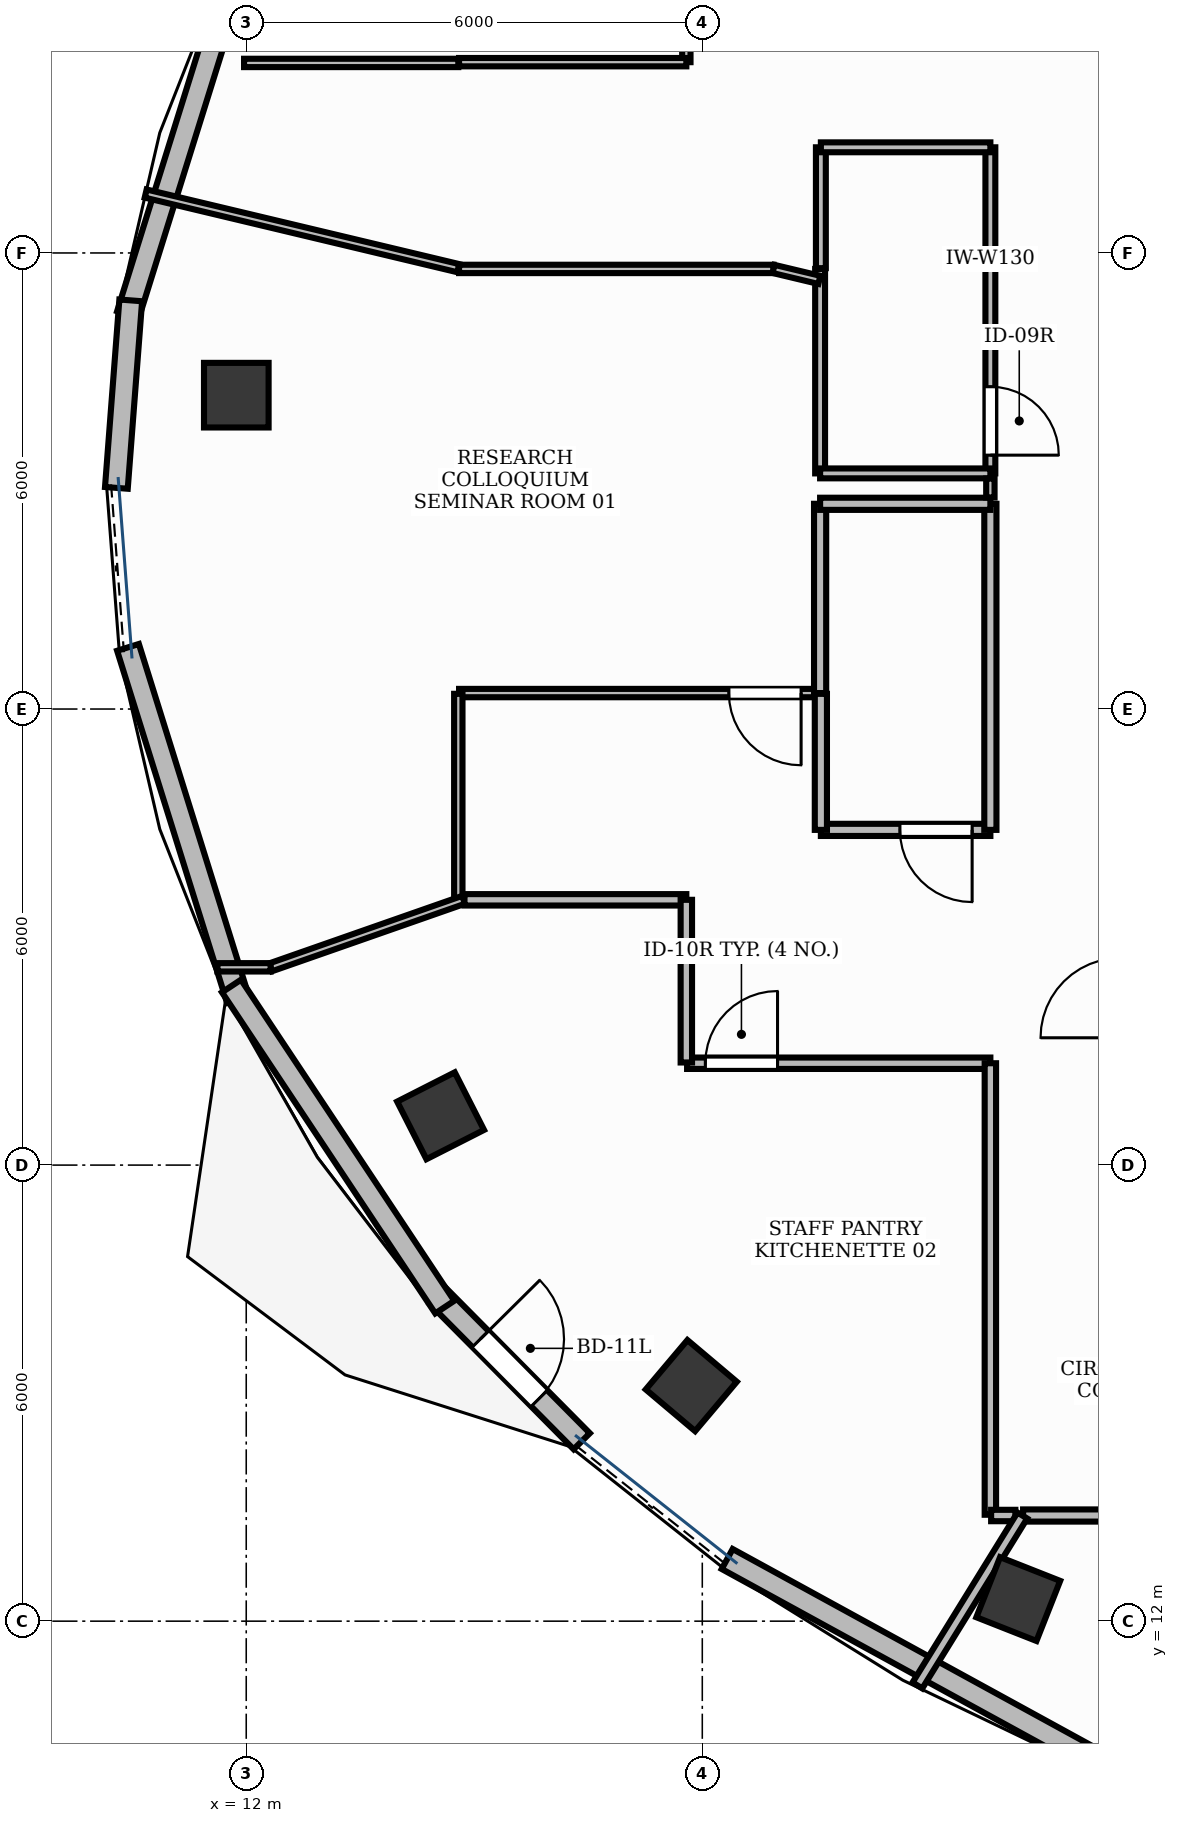
"""IFC4 building model, lengths in metres.
Left out: names, types, materials, properties, quantities, classifications, styles, units other than length and angle.
Written with IfcOpenShell. Run it as: python <this file> out.ifc"""

import sys

from ifc_helpers import new_model, si_unit, direction, frame, frame_2d, origin, origin_2d, place, context, subcontext, project, spatial, rectangle, extrude, element, fill, save


model = new_model("IFC4")
c1 = context("Model", 3, precision=1e-05, world=origin(), true_north=direction((0.0, 1.0)))
c2 = subcontext(c1, "Body", "Model", "MODEL_VIEW")
j1 = project(units=[si_unit("LENGTHUNIT", "METRE"), si_unit("PLANEANGLEUNIT", "RADIAN")], contexts=[c1])
p1 = place(None, origin())
s1 = spatial("IfcSite", under=j1, at=p1, CompositionType="ELEMENT")
p2 = place(p1, origin())
s2 = spatial("IfcBuilding", under=s1, at=p2, CompositionType="ELEMENT")
p3 = place(p2, frame((0.0, 0.0, 286.8)))
s3 = spatial("IfcBuildingStorey", under=s2, at=p3, CompositionType="ELEMENT", Elevation=286.8)
for number, where, z_axis, x_axis in (
    (1, (11.869, 28.129, -0.0), (0.0, 0.0, 1.0), (0.0, 1.0, 0.0)),
    (2, (14.557, 18.649, -0.0), (0.0, 0.0, 1.0), (-0.453, 0.891, 0.0)),
    (3, (17.855, 15.099, -0.0), (0.0, 0.0, 1.0), (-0.764, 0.645, 0.0)),
    (4, (22.157, 12.291, -0.0), (0.0, 0.0, 1.0), (-0.93, 0.367, 0.0)),
):
    element("IfcColumn", number, at=place(p3, frame(where, z_axis=z_axis, x_axis=x_axis)), inside=s3, PredefinedType="COLUMN", context=c2, shape_type="SweptSolid", body=[
        extrude(rectangle(XDim=0.85, YDim=0.85, at=origin_2d()), origin(), (0.0, 0.0, 1.0), 3.901),
    ])
p4 = place(p3, frame((14.522, 16.276, 0.0), z_axis=(0.0, 0.0, 1.0), x_axis=(0.703783131399, -0.710414881572, 0.0)))
e5 = element("IfcWall", 5, at=p4, inside=s3, PredefinedType="STANDARD", context=c2, shape_type="SweptSolid", body=[
    extrude(rectangle(XDim=2.688, YDim=0.3, at=frame_2d((1.344, 0.0))), origin(), (0.0, 0.0, 1.0), 3.9),
])
p5 = place(p4, frame((0.794, 0.0, 0.0)))
e6 = element("IfcOpeningElement", 6, at=p5, cuts=e5, PredefinedType="OPENING", context=c2, shape_type="SweptSolid", body=[
    extrude(rectangle(XDim=1.1, YDim=2.15, at=frame_2d((0.55, 1.075))), frame((0.0, 0.165, 0.0), z_axis=(0.0, -1.0, 0.0), x_axis=(1.0, 0.0, 0.0)), (0.0, 0.0, 1.0), 0.33),
])
p6 = place(p3, frame((11.891, 33.823, 0.0), z_axis=(0.0, 0.0, 1.0), x_axis=(-0.297974306034, -0.954573890772, 0.0)))
e7 = element("IfcWall", 7, at=p6, inside=s3, PredefinedType="STANDARD", context=c2, shape_type="SweptSolid", body=[
    extrude(rectangle(XDim=4.854, YDim=0.3, at=frame_2d((2.427, 0.0))), origin(), (0.0, 0.0, 1.0), 3.9),
])
p7 = place(p3, frame((10.48, 29.376, 0.0), z_axis=(0.0, 0.0, 1.0), x_axis=(-0.076379552952, -0.997078815285, 0.0)))
e8 = element("IfcWall", 8, at=p7, inside=s3, PredefinedType="STANDARD", context=c2, shape_type="SweptSolid", body=[
    extrude(rectangle(XDim=2.474, YDim=0.3, at=frame_2d((1.237, 0.0))), origin(), (0.0, 0.0, 1.0), 3.9),
])
p8 = place(p3, frame((10.445, 24.811, 0.0), z_axis=(0.0, 0.0, 1.0), x_axis=(0.297974306034, -0.954573890772, 0.0)))
e9 = element("IfcWall", 9, at=p8, inside=s3, PredefinedType="STANDARD", context=c2, shape_type="SweptSolid", body=[
    extrude(rectangle(XDim=4.854, YDim=0.3, at=frame_2d((2.427, 0.0))), origin(), (0.0, 0.0, 1.0), 3.9),
])
p9 = place(p3, frame((11.806, 20.356, 0.0), z_axis=(0.0, 0.0, 1.0), x_axis=(0.553332864868, -0.832960227536, 0.0)))
e10 = element("IfcWall", 10, at=p9, inside=s3, PredefinedType="STANDARD", context=c2, shape_type="SweptSolid", body=[
    extrude(rectangle(XDim=5.071, YDim=0.3, at=frame_2d((2.535, 0.0))), origin(), (0.0, 0.0, 1.0), 3.9),
])
p10 = place(p3, frame((18.327, 12.818, 0.0), z_axis=(0.0, 0.0, 1.0), x_axis=(0.877062479499, -0.480376318166, 0.0)))
e11 = element("IfcWall", 11, at=p10, inside=s3, PredefinedType="STANDARD", context=c2, shape_type="SweptSolid", body=[
    extrude(rectangle(XDim=5.654, YDim=0.3, at=frame_2d((2.827, 0.0))), origin(), (0.0, 0.0, 1.0), 3.9),
])
p11 = place(p3, frame((21.79, 22.41, 0.0), z_axis=(0.0, 0.0, 1.0), x_axis=(-1.0, 0.0, 0.0)))
e12 = element("IfcWall", 12, at=p11, inside=s3, PredefinedType="PARTITIONING", context=c2, shape_type="SweptSolid", body=[
    extrude(rectangle(XDim=2.23, YDim=0.16, at=frame_2d((1.115, 0.0))), origin(), (0.0, 0.0, 1.0), 2.22),
])
p12 = place(p11, frame((0.24, 0.0, 0.0)))
e13 = element("IfcOpeningElement", 13, at=p12, cuts=e12, PredefinedType="OPENING", context=c2, shape_type="SweptSolid", body=[
    extrude(rectangle(XDim=0.95, YDim=2.15, at=frame_2d((0.475, 1.075))), frame((0.0, 0.095, 0.0), z_axis=(0.0, -1.0, 0.0), x_axis=(1.0, 0.0, 0.0)), (0.0, 0.0, 1.0), 0.19),
])
p13 = place(p3, frame((21.79, 31.39, 0.0), z_axis=(0.0, 0.0, 1.0), x_axis=(0.0, -1.0, 0.0)))
e14 = element("IfcWall", 14, at=p13, inside=s3, PredefinedType="PARTITIONING", context=c2, shape_type="SweptSolid", body=[
    extrude(rectangle(XDim=4.29, YDim=0.13, at=frame_2d((2.145, 0.0))), origin(), (0.0, 0.0, 1.0), 2.22),
])
p14 = place(p13, frame((3.15, 0.0, 0.0)))
e15 = element("IfcOpeningElement", 15, at=p14, cuts=e14, PredefinedType="OPENING", context=c2, shape_type="SweptSolid", body=[
    extrude(rectangle(XDim=0.9, YDim=2.15, at=frame_2d((0.45, 1.075))), frame((0.0, 0.08, 0.0), z_axis=(0.0, -1.0, 0.0), x_axis=(1.0, 0.0, 0.0)), (0.0, 0.0, 1.0), 0.16),
])
p15 = place(p3, frame((19.54, 24.21, 0.0), z_axis=(0.0, 0.0, 1.0), x_axis=(-1.0, 0.0, 0.0)))
e16 = element("IfcWall", 16, at=p15, inside=s3, PredefinedType="MOVABLE", context=c2, shape_type="SweptSolid", body=[
    extrude(rectangle(XDim=4.74, YDim=0.11, at=frame_2d((2.37, 0.0))), origin(), (0.0, 0.0, 1.0), 2.22),
])
p16 = place(p15, frame((0.24, 0.0, 0.0)))
e17 = element("IfcOpeningElement", 17, at=p16, cuts=e16, PredefinedType="OPENING", context=c2, shape_type="SweptSolid", body=[
    extrude(rectangle(XDim=0.95, YDim=2.15, at=frame_2d((0.475, 1.075))), frame((0.0, 0.07, 0.0), z_axis=(0.0, -1.0, 0.0), x_axis=(1.0, 0.0, 0.0)), (0.0, 0.0, 1.0), 0.14),
])
p17 = place(p3, frame((17.8, 19.34, 0.0), z_axis=(0.0, 0.0, 1.0), x_axis=(1.0, 0.0, 0.0)))
e18 = element("IfcWall", 18, at=p17, inside=s3, PredefinedType="PARTITIONING", context=c2, shape_type="SweptSolid", body=[
    extrude(rectangle(XDim=3.99, YDim=0.15, at=frame_2d((1.995, 0.0))), origin(), (0.0, 0.0, 1.0), 2.22),
])
p18 = place(p17, frame((0.24, 0.0, 0.0)))
e19 = element("IfcOpeningElement", 19, at=p18, cuts=e18, PredefinedType="OPENING", context=c2, shape_type="SweptSolid", body=[
    extrude(rectangle(XDim=0.95, YDim=2.15, at=frame_2d((0.475, 1.075))), frame((0.0, 0.09, 0.0), z_axis=(0.0, -1.0, 0.0), x_axis=(1.0, 0.0, 0.0)), (0.0, 0.0, 1.0), 0.18),
])
p19 = place(p3, frame((22.22, 13.39, 0.0), z_axis=(0.0, 0.0, 1.0), x_axis=(1.0, 0.0, 0.0)))
e20 = element("IfcWall", 20, at=p19, inside=s3, PredefinedType="PARTITIONING", context=c2, shape_type="SweptSolid", body=[
    extrude(rectangle(XDim=11.478, YDim=0.16, at=frame_2d((5.739, 0.0))), origin(), (0.0, 0.0, 1.0), 2.22),
])
p20 = place(p19, frame((7.786, 0.0, 0.0)))
e21 = element("IfcOpeningElement", 21, at=p20, cuts=e20, PredefinedType="OPENING", context=c2, shape_type="SweptSolid", body=[
    extrude(rectangle(XDim=0.95, YDim=2.15, at=frame_2d((0.475, 1.075))), frame((0.0, 0.095, 0.0), z_axis=(0.0, -1.0, 0.0), x_axis=(1.0, 0.0, 0.0)), (0.0, 0.0, 1.0), 0.19),
])
p21 = place(p3, frame((21.79, 26.7, 0.0), z_axis=(0.0, 0.0, 1.0), x_axis=(0.0, -1.0, 0.0)))
e22 = element("IfcWall", 22, at=p21, inside=s3, PredefinedType="PARTITIONING", context=c2, shape_type="SweptSolid", body=[
    extrude(rectangle(XDim=4.29, YDim=0.16, at=frame_2d((2.145, 0.0))), origin(), (0.0, 0.0, 1.0), 2.22),
])
p22 = place(p3, frame((19.56, 22.41, 0.0), z_axis=(0.0, 0.0, 1.0), x_axis=(0.0, 1.0, 0.0)))
e23 = element("IfcWall", 23, at=p22, inside=s3, PredefinedType="PARTITIONING", context=c2, shape_type="SweptSolid", body=[
    extrude(rectangle(XDim=1.79, YDim=0.16, at=frame_2d((0.895, 0.0))), origin(), (0.0, 0.0, 1.0), 2.22),
])
p23 = place(p3, frame((19.55, 24.21, 0.0), z_axis=(0.0, 0.0, 1.0), x_axis=(0.0, 1.0, 0.0)))
e24 = element("IfcWall", 24, at=p23, inside=s3, PredefinedType="PARTITIONING", context=c2, shape_type="SweptSolid", body=[
    extrude(rectangle(XDim=2.49, YDim=0.16, at=frame_2d((1.245, 0.0))), origin(), (0.0, 0.0, 1.0), 2.22),
])
p24 = place(p3, frame((19.55, 26.7, 0.0), z_axis=(0.0, 0.0, 1.0), x_axis=(1.0, 0.0, 0.0)))
e25 = element("IfcWall", 25, at=p24, inside=s3, PredefinedType="PARTITIONING", context=c2, shape_type="SweptSolid", body=[
    extrude(rectangle(XDim=2.24, YDim=0.16, at=frame_2d((1.12, 0.0))), origin(), (0.0, 0.0, 1.0), 2.22),
])
p25 = place(p3, frame((19.55, 27.1, 0.0), z_axis=(0.0, 0.0, 1.0), x_axis=(0.0, 1.0, 0.0)))
e26 = element("IfcWall", 26, at=p25, inside=s3, PredefinedType="PARTITIONING", context=c2, shape_type="SweptSolid", body=[
    extrude(rectangle(XDim=2.69, YDim=0.13, at=frame_2d((1.345, 0.0))), origin(), (0.0, 0.0, 1.0), 2.22),
])
p26 = place(p3, frame((19.56, 29.8, 0.0), z_axis=(0.0, 0.0, 1.0), x_axis=(0.0, 1.0, 0.0)))
e27 = element("IfcWall", 27, at=p26, inside=s3, PredefinedType="PARTITIONING", context=c2, shape_type="SweptSolid", body=[
    extrude(rectangle(XDim=1.59, YDim=0.13, at=frame_2d((0.795, 0.0))), origin(), (0.0, 0.0, 1.0), 2.22),
])
p27 = place(p3, frame((19.56, 31.39, 0.0), z_axis=(0.0, 0.0, 1.0), x_axis=(1.0, 0.0, 0.0)))
e28 = element("IfcWall", 28, at=p27, inside=s3, PredefinedType="PARTITIONING", context=c2, shape_type="SweptSolid", body=[
    extrude(rectangle(XDim=2.23, YDim=0.13, at=frame_2d((1.115, 0.0))), origin(), (0.0, 0.0, 1.0), 2.22),
])
p28 = place(p3, frame((21.79, 27.1, 0.0), z_axis=(0.0, 0.0, 1.0), x_axis=(-1.0, 0.0, 0.0)))
e29 = element("IfcWall", 29, at=p28, inside=s3, PredefinedType="PARTITIONING", context=c2, shape_type="SweptSolid", body=[
    extrude(rectangle(XDim=2.24, YDim=0.13, at=frame_2d((1.12, 0.0))), origin(), (0.0, 0.0, 1.0), 2.22),
])
p29 = place(p3, frame((10.677, 30.781, 0.0), z_axis=(0.0, 0.0, 1.0), x_axis=(0.972691489336, -0.232101845262, 0.0)))
e30 = element("IfcWall", 30, at=p29, inside=s3, PredefinedType="MOVABLE", context=c2, shape_type="SweptSolid", body=[
    extrude(rectangle(XDim=4.229, YDim=0.11, at=frame_2d((2.114, 0.0))), origin(), (0.0, 0.0, 1.0), 2.22),
])
p30 = place(p3, frame((14.8, 29.79, 0.0), z_axis=(0.0, 0.0, 1.0), x_axis=(1.0, 0.0, 0.0)))
e31 = element("IfcWall", 31, at=p30, inside=s3, PredefinedType="MOVABLE", context=c2, shape_type="SweptSolid", body=[
    extrude(rectangle(XDim=4.137, YDim=0.11, at=frame_2d((2.068, 0.0))), origin(), (0.0, 0.0, 1.0), 2.22),
])
p31 = place(p3, frame((18.937, 29.79, 0.0), z_axis=(0.0, 0.0, 1.0), x_axis=(0.972569213729, -0.232613680823, 0.0)))
e32 = element("IfcWall", 32, at=p31, inside=s3, PredefinedType="MOVABLE", context=c2, shape_type="SweptSolid", body=[
    extrude(rectangle(XDim=0.62, YDim=0.11, at=frame_2d((0.31, 0.0))), origin(), (0.0, 0.0, 1.0), 2.22),
])
p32 = place(p3, frame((21.79, 27.032, 0.0), z_axis=(0.0, 0.0, 1.0), x_axis=(0.0, -1.0, 0.0)))
e33 = element("IfcWall", 33, at=p32, inside=s3, PredefinedType="MOVABLE", context=c2, shape_type="SweptSolid", body=[
    extrude(rectangle(XDim=0.249, YDim=0.11, at=frame_2d((0.125, 0.0))), origin(), (0.0, 0.0, 1.0), 2.22),
])
p33 = place(p3, frame((14.79, 24.2, 0.0), z_axis=(0.0, 0.0, 1.0), x_axis=(0.0, -1.0, 0.0)))
e34 = element("IfcWall", 34, at=p33, inside=s3, PredefinedType="MOVABLE", context=c2, shape_type="SweptSolid", body=[
    extrude(rectangle(XDim=2.7, YDim=0.11, at=frame_2d((1.35, 0.0))), origin(), (0.0, 0.0, 1.0), 2.22),
])
p34 = place(p3, frame((14.859, 21.49, 0.0), z_axis=(0.0, 0.0, 1.0), x_axis=(-0.943913543367, -0.330192705321, 0.0)))
e35 = element("IfcWall", 35, at=p34, inside=s3, PredefinedType="MOVABLE", context=c2, shape_type="SweptSolid", body=[
    extrude(rectangle(XDim=2.689, YDim=0.11, at=frame_2d((1.345, 0.0))), origin(), (0.0, 0.0, 1.0), 2.22),
])
p35 = place(p3, frame((12.321, 20.602, 0.0), z_axis=(0.0, 0.0, 1.0), x_axis=(-1.0, 0.0, 0.0)))
e36 = element("IfcWall", 36, at=p35, inside=s3, PredefinedType="MOVABLE", context=c2, shape_type="SweptSolid", body=[
    extrude(rectangle(XDim=0.7, YDim=0.11, at=frame_2d((0.35, 0.0))), origin(), (0.0, 0.0, 1.0), 2.22),
])
p36 = place(p3, frame((14.871, 21.49, 0.0), z_axis=(0.0, 0.0, 1.0), x_axis=(1.0, 0.0, 0.0)))
e37 = element("IfcWall", 37, at=p36, inside=s3, PredefinedType="PARTITIONING", context=c2, shape_type="SweptSolid", body=[
    extrude(rectangle(XDim=2.919, YDim=0.15, at=frame_2d((1.459, 0.0))), origin(), (0.0, 0.0, 1.0), 2.22),
])
p37 = place(p3, frame((17.79, 21.49, 0.0), z_axis=(0.0, 0.0, 1.0), x_axis=(0.0, -1.0, 0.0)))
e38 = element("IfcWall", 38, at=p37, inside=s3, PredefinedType="PARTITIONING", context=c2, shape_type="SweptSolid", body=[
    extrude(rectangle(XDim=2.14, YDim=0.15, at=frame_2d((1.07, 0.0))), origin(), (0.0, 0.0, 1.0), 2.22),
])
p38 = place(p3, frame((21.79, 19.34, 0.0), z_axis=(0.0, 0.0, 1.0), x_axis=(0.0, -1.0, 0.0)))
e39 = element("IfcWall", 39, at=p38, inside=s3, PredefinedType="PARTITIONING", context=c2, shape_type="SweptSolid", body=[
    extrude(rectangle(XDim=5.94, YDim=0.15, at=frame_2d((2.97, 0.0))), origin(), (0.0, 0.0, 1.0), 2.22),
])
p39 = place(p3, frame((21.8, 13.39, 0.0), z_axis=(0.0, 0.0, 1.0), x_axis=(1.0, 0.0, 0.0)))
e40 = element("IfcWall", 40, at=p39, inside=s3, PredefinedType="PARTITIONING", context=c2, shape_type="SweptSolid", body=[
    extrude(rectangle(XDim=0.319, YDim=0.15, at=frame_2d((0.159, 0.0))), origin(), (0.0, 0.0, 1.0), 2.22),
])
p40 = place(p3, frame((22.21, 13.39, 0.0), z_axis=(0.0, 0.0, 1.0), x_axis=(-0.525388006785, -0.850862763509, 0.0)))
e41 = element("IfcWall", 41, at=p40, inside=s3, PredefinedType="PARTITIONING", context=c2, shape_type="SweptSolid", body=[
    extrude(rectangle(XDim=2.627, YDim=0.15, at=frame_2d((1.313, 0.0))), origin(), (0.0, 0.0, 1.0), 2.22),
])
p41 = place(p3, frame((17.79, 34.55, 0.0), z_axis=(0.0, 0.0, 1.0), x_axis=(0.0, -1.0, 0.0)))
e42 = element("IfcWall", 42, at=p41, inside=s3, PredefinedType="MOVABLE", context=c2, shape_type="SweptSolid", body=[
    extrude(rectangle(XDim=2.04, YDim=0.11, at=frame_2d((1.02, 0.0))), origin(), (0.0, 0.0, 1.0), 2.22),
])
p42 = place(p3, frame((17.79, 32.51, 0.0), z_axis=(0.0, 0.0, 1.0), x_axis=(-1.0, 0.0, 0.0)))
e43 = element("IfcWall", 43, at=p42, inside=s3, PredefinedType="MOVABLE", context=c2, shape_type="SweptSolid", body=[
    extrude(rectangle(XDim=2.99, YDim=0.11, at=frame_2d((1.495, 0.0))), origin(), (0.0, 0.0, 1.0), 2.22),
])
p43 = place(p3, frame((14.79, 32.5, 0.0), z_axis=(0.0, 0.0, 1.0), x_axis=(-1.0, 0.0, 0.0)))
e44 = element("IfcWall", 44, at=p43, inside=s3, PredefinedType="MOVABLE", context=c2, shape_type="SweptSolid", body=[
    extrude(rectangle(XDim=2.819, YDim=0.11, at=frame_2d((1.409, 0.0))), origin(), (0.0, 0.0, 1.0), 2.22),
])
p44 = place(p5, origin())
e45 = element("IfcDoor", 45, at=p44, inside=s3, OperationType="SINGLE_SWING_LEFT", PredefinedType="DOOR", context=c2, shape_type="SweptSolid", body=[
    extrude(rectangle(XDim=1.1, YDim=2.15, at=frame_2d((0.55, 1.075))), frame((0.0, 0.025, 0.0), z_axis=(0.0, -1.0, 0.0), x_axis=(1.0, 0.0, 0.0)), (0.0, 0.0, 1.0), 0.05),
])
fill(e6, e45)
p45 = place(p12, origin())
e46 = element("IfcDoor", 46, at=p45, inside=s3, OperationType="SINGLE_SWING_LEFT", PredefinedType="DOOR", context=c2, shape_type="SweptSolid", body=[
    extrude(rectangle(XDim=0.95, YDim=2.15, at=frame_2d((0.475, 1.075))), frame((0.0, 0.025, 0.0), z_axis=(0.0, -1.0, 0.0), x_axis=(1.0, 0.0, 0.0)), (0.0, 0.0, 1.0), 0.05),
])
fill(e13, e46)
p46 = place(p14, origin())
e47 = element("IfcDoor", 47, at=p46, inside=s3, OperationType="SINGLE_SWING_RIGHT", PredefinedType="DOOR", context=c2, shape_type="SweptSolid", body=[
    extrude(rectangle(XDim=0.9, YDim=2.15, at=frame_2d((0.45, 1.075))), frame((0.0, 0.025, 0.0), z_axis=(0.0, -1.0, 0.0), x_axis=(1.0, 0.0, 0.0)), (0.0, 0.0, 1.0), 0.05),
])
fill(e15, e47)
p47 = place(p16, origin())
e48 = element("IfcDoor", 48, at=p47, inside=s3, OperationType="SINGLE_SWING_LEFT", PredefinedType="DOOR", context=c2, shape_type="SweptSolid", body=[
    extrude(rectangle(XDim=0.95, YDim=2.15, at=frame_2d((0.475, 1.075))), frame((0.0, 0.025, 0.0), z_axis=(0.0, -1.0, 0.0), x_axis=(1.0, 0.0, 0.0)), (0.0, 0.0, 1.0), 0.05),
])
fill(e17, e48)
p48 = place(p18, origin())
e49 = element("IfcDoor", 49, at=p48, inside=s3, OperationType="SINGLE_SWING_RIGHT", PredefinedType="DOOR", context=c2, shape_type="SweptSolid", body=[
    extrude(rectangle(XDim=0.95, YDim=2.15, at=frame_2d((0.475, 1.075))), frame((0.0, 0.025, 0.0), z_axis=(0.0, -1.0, 0.0), x_axis=(1.0, 0.0, 0.0)), (0.0, 0.0, 1.0), 0.05),
])
fill(e19, e49)
save(model, sys.argv[1])
